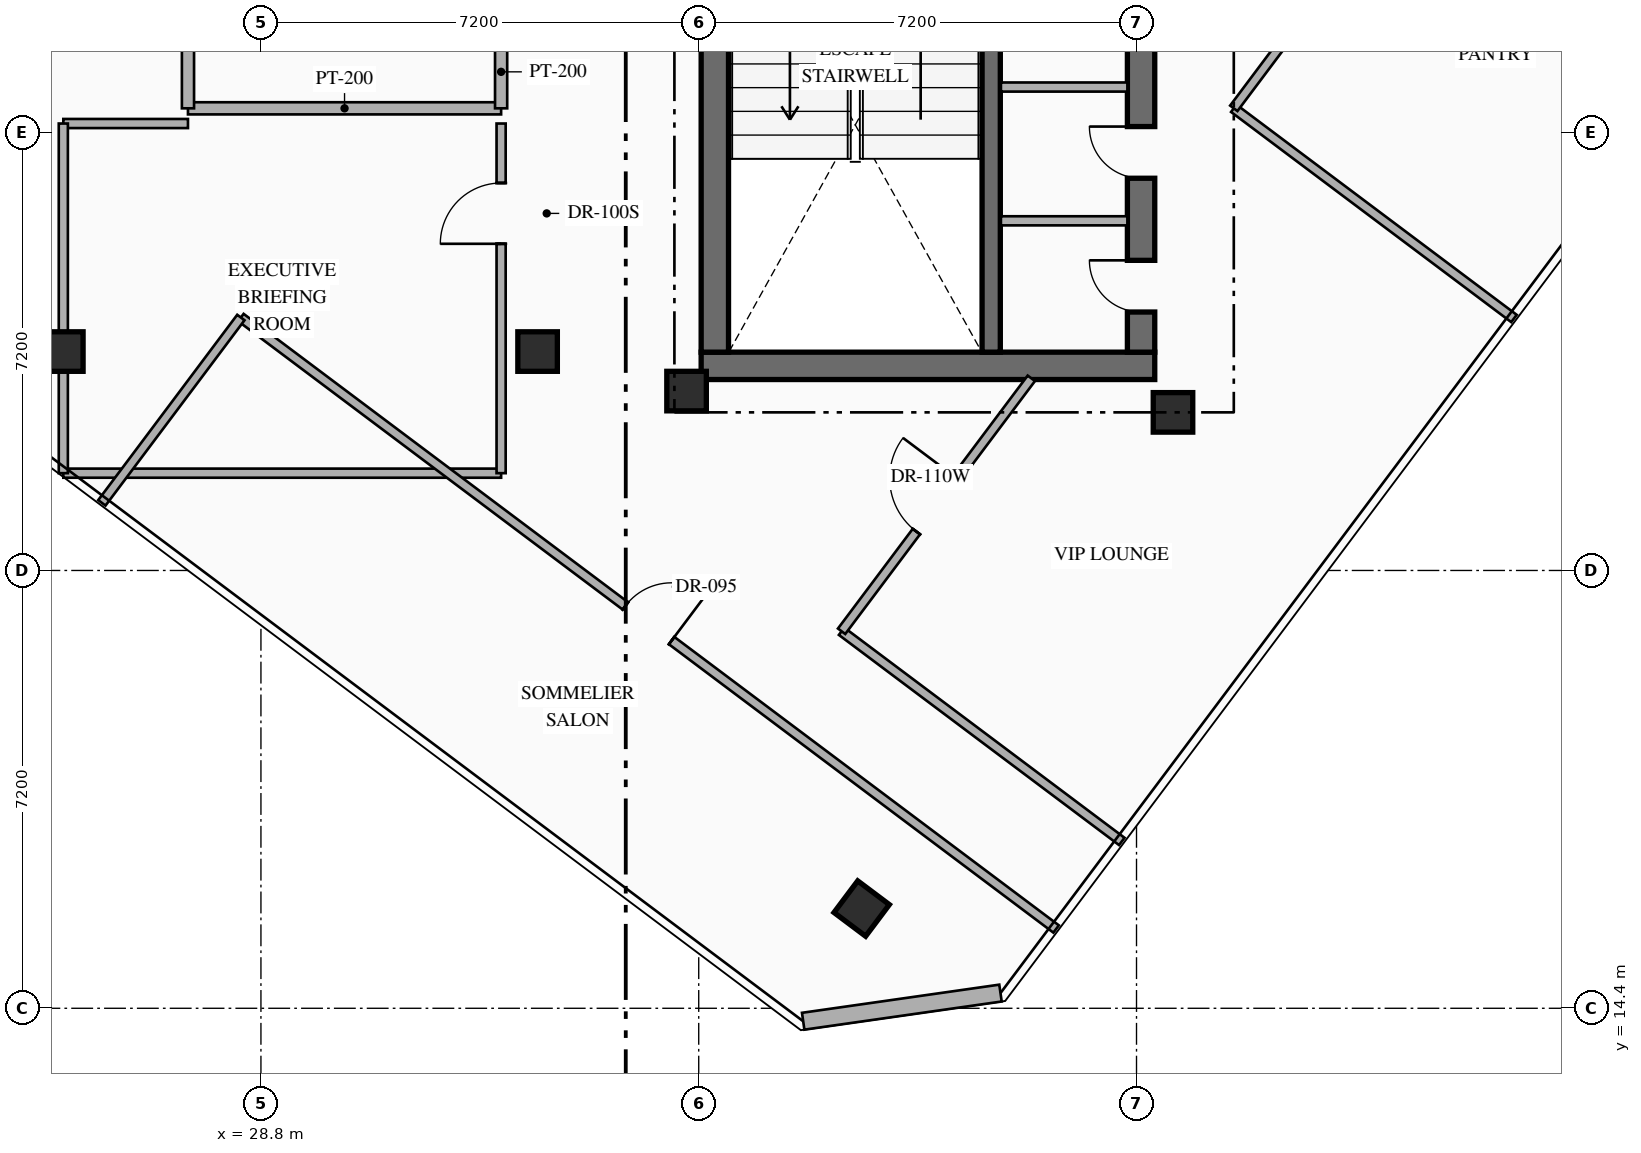
"""IFC4 building model, lengths in metres.
Left out: names, types, materials, properties, quantities, classifications, styles, units other than length and angle.
Written with IfcOpenShell. Run it as: python <this file> out.ifc"""

import sys

from ifc_helpers import new_model, si_unit, direction, frame, frame_2d, origin, origin_2d, place, context, subcontext, project, spatial, rectangle, hollow_rectangle, extrude, element, fill, save


model = new_model("IFC4")
c1 = context("Model", 3, precision=1e-05, world=origin(), true_north=direction((0.0, 1.0)))
c2 = subcontext(c1, "Body", "Model", "MODEL_VIEW")
j1 = project(units=[si_unit("LENGTHUNIT", "METRE"), si_unit("PLANEANGLEUNIT", "RADIAN")], contexts=[c1])
p1 = place(None, origin())
s1 = spatial("IfcSite", under=j1, at=p1, CompositionType="ELEMENT")
p2 = place(p1, origin())
s2 = spatial("IfcBuilding", under=s1, at=p2, CompositionType="ELEMENT")
p3 = place(p2, frame((0.0, 0.0, 261.75)))
s3 = spatial("IfcBuildingStorey", under=s2, at=p3, CompositionType="ELEMENT", Elevation=261.75)
p4 = place(p3, frame((36.04, 24.965, 0.0), z_axis=(0.0, 0.0, 1.0), x_axis=(1.0, 0.0, 0.0)))
e1 = element("IfcWall", 1, at=p4, inside=s3, PredefinedType="SHEAR", context=c2, shape_type="SweptSolid", body=[
    extrude(rectangle(XDim=7.46, YDim=0.45, at=frame_2d((3.73, 0.0))), origin(), (0.0, 0.0, 1.0), 4.2),
])
p5 = place(p3, frame((36.265, 25.19, 0.0), z_axis=(0.0, 0.0, 1.0), x_axis=(0.0, 1.0, 0.0)))
e2 = element("IfcWall", 2, at=p5, inside=s3, PredefinedType="SHEAR", context=c2, shape_type="SweptSolid", body=[
    extrude(rectangle(XDim=9.48, YDim=0.45, at=frame_2d((4.74, 0.0))), origin(), (0.0, 0.0, 1.0), 4.2),
])
p6 = place(p3, frame((43.275, 25.19, 0.0), z_axis=(0.0, 0.0, 1.0), x_axis=(0.0, 1.0, 0.0)))
e3 = element("IfcWall", 3, at=p6, inside=s3, PredefinedType="SHEAR", context=c2, shape_type="SweptSolid", body=[
    extrude(rectangle(XDim=9.48, YDim=0.45, at=frame_2d((4.74, 0.0))), origin(), (0.0, 0.0, 1.0), 4.2),
])
p7 = place(p6, frame((0.66, 0.0, 0.0)))
e4 = element("IfcOpeningElement", 4, at=p7, cuts=e3, PredefinedType="OPENING", context=c2, shape_type="SweptSolid", body=[
    extrude(rectangle(XDim=0.85, YDim=2.08, at=frame_2d((0.425, 1.04))), frame((0.0, 0.235, 0.0), z_axis=(0.0, -1.0, 0.0), x_axis=(1.0, 0.0, 0.0)), (0.0, 0.0, 1.0), 0.47),
])
p8 = place(p6, frame((2.86, 0.0, 0.0)))
e5 = element("IfcOpeningElement", 5, at=p8, cuts=e3, PredefinedType="OPENING", context=c2, shape_type="SweptSolid", body=[
    extrude(rectangle(XDim=0.85, YDim=2.08, at=frame_2d((0.425, 1.04))), frame((0.0, 0.235, 0.0), z_axis=(0.0, -1.0, 0.0), x_axis=(1.0, 0.0, 0.0)), (0.0, 0.0, 1.0), 0.47),
])
p9 = place(p6, frame((5.01, 0.0, 0.0)))
e6 = element("IfcOpeningElement", 6, at=p9, cuts=e3, PredefinedType="OPENING", context=c2, shape_type="SweptSolid", body=[
    extrude(rectangle(XDim=0.85, YDim=2.08, at=frame_2d((0.425, 1.04))), frame((0.0, 0.235, 0.0), z_axis=(0.0, -1.0, 0.0), x_axis=(1.0, 0.0, 0.0)), (0.0, 0.0, 1.0), 0.47),
])
p10 = place(p3, frame((40.81, 25.19, 0.0), z_axis=(0.0, 0.0, 1.0), x_axis=(0.0, 1.0, 0.0)))
e7 = element("IfcWall", 7, at=p10, inside=s3, PredefinedType="SHEAR", context=c2, shape_type="SweptSolid", body=[
    extrude(rectangle(XDim=9.48, YDim=0.3, at=frame_2d((4.74, 0.0))), origin(), (0.0, 0.0, 1.0), 4.2),
])
for number, where, z_axis, x_axis in (
    (8, (35.8, 24.55, 0.0), (0.0, 0.0, 1.0), (1.0, 0.0, 0.0)),
    (9, (43.8, 24.2, 0.0), (0.0, 0.0, 1.0), (1.0, 0.0, 0.0)),
    (10, (25.55, 25.2, 0.0), (0.0, 0.0, 1.0), (1.0, 0.0, 0.0)),
    (11, (33.35, 25.2, 0.0), (0.0, 0.0, 1.0), (1.0, 0.0, 0.0)),
    (12, (38.68, 16.04, 0.0), (0.0, 0.0, 1.0), (0.8, -0.6, 0.0)),
):
    element("IfcColumn", number, at=place(p3, frame(where, z_axis=z_axis, x_axis=x_axis)), inside=s3, PredefinedType="COLUMN", context=c2, shape_type="SweptSolid", body=[
        extrude(hollow_rectangle(XDim=0.65, YDim=0.65, WallThickness=0.025, at=origin_2d()), origin(), (0.0, 0.0, 1.0), 4.2),
    ])
p11 = place(p3, frame((40.963, 14.65, 0.0), z_axis=(0.0, 0.0, 1.0), x_axis=(-0.989977778067, -0.141223223777, 0.0)))
e13 = element("IfcWall", 13, at=p11, inside=s3, PredefinedType="STANDARD", context=c2, shape_type="SweptSolid", body=[
    extrude(rectangle(XDim=3.278, YDim=0.28, at=frame_2d((1.639, 0.0))), origin(), (0.0, 0.0, 1.0), 3.94),
])
for number, where, z_axis, x_axis in (
    (14, (40.97, 27.35, 0.0), (0.0, 0.0, 1.0), (1.0, 0.0, 0.0)),
    (15, (40.97, 29.55, 0.0), (0.0, 0.0, 1.0), (1.0, 0.0, 0.0)),
):
    element("IfcWall", number, at=place(p3, frame(where, z_axis=z_axis, x_axis=x_axis)), inside=s3, PredefinedType="PARTITIONING", context=c2, shape_type="SweptSolid", body=[
        extrude(rectangle(XDim=2.08, YDim=0.15, at=frame_2d((1.04, 0.0))), origin(), (0.0, 0.0, 1.0), 3.94),
    ])
p12 = place(p3, frame((27.6, 29.2, 0.0), z_axis=(0.0, 0.0, 1.0), x_axis=(1.0, 0.0, 0.0)))
e16 = element("IfcWall", 16, at=p12, inside=s3, PredefinedType="STANDARD", context=c2, shape_type="SweptSolid", body=[
    extrude(rectangle(XDim=5.15, YDim=0.2, at=frame_2d((2.575, 0.0))), origin(), (0.0, 0.0, 1.0), 3.94),
])
p13 = place(p3, frame((27.6, 29.2, 0.0), z_axis=(0.0, 0.0, 1.0), x_axis=(0.0, 1.0, 0.0)))
e17 = element("IfcWall", 17, at=p13, inside=s3, PredefinedType="STANDARD", context=c2, shape_type="SweptSolid", body=[
    extrude(rectangle(XDim=3.54, YDim=0.2, at=frame_2d((1.77, 0.0))), origin(), (0.0, 0.0, 1.0), 3.94),
])
p14 = place(p3, frame((32.75, 29.2, 0.0), z_axis=(0.0, 0.0, 1.0), x_axis=(0.0, 1.0, 0.0)))
e18 = element("IfcWall", 18, at=p14, inside=s3, PredefinedType="STANDARD", context=c2, shape_type="SweptSolid", body=[
    extrude(rectangle(XDim=3.54, YDim=0.2, at=frame_2d((1.77, 0.0))), origin(), (0.0, 0.0, 1.0), 3.94),
])
p15 = place(p14, frame((1.45, 0.0, 0.0)))
e19 = element("IfcOpeningElement", 19, at=p15, cuts=e18, PredefinedType="OPENING", context=c2, shape_type="SweptSolid", body=[
    extrude(rectangle(XDim=1.0, YDim=2.2, at=frame_2d((0.5, 1.1))), frame((0.0, 0.11, 0.0), z_axis=(0.0, -1.0, 0.0), x_axis=(1.0, 0.0, 0.0)), (0.0, 0.0, 1.0), 0.22),
])
p16 = place(p3, frame((25.55, 23.2, 0.0), z_axis=(0.0, 0.0, 1.0), x_axis=(1.0, 0.0, 0.0)))
e20 = element("IfcWall", 20, at=p16, inside=s3, PredefinedType="PARTITIONING", context=c2, shape_type="SweptSolid", body=[
    extrude(rectangle(XDim=7.2, YDim=0.15, at=frame_2d((3.6, 0.0))), origin(), (0.0, 0.0, 1.0), 3.94),
])
p17 = place(p3, frame((25.55, 28.95, 0.0), z_axis=(0.0, 0.0, 1.0), x_axis=(1.0, 0.0, 0.0)))
e21 = element("IfcWall", 21, at=p17, inside=s3, PredefinedType="PARTITIONING", context=c2, shape_type="SweptSolid", body=[
    extrude(rectangle(XDim=2.05, YDim=0.15, at=frame_2d((1.025, 0.0))), origin(), (0.0, 0.0, 1.0), 3.94),
])
p18 = place(p3, frame((25.55, 23.2, 0.0), z_axis=(0.0, 0.0, 1.0), x_axis=(0.0, 1.0, 0.0)))
e22 = element("IfcWall", 22, at=p18, inside=s3, PredefinedType="PARTITIONING", context=c2, shape_type="SweptSolid", body=[
    extrude(rectangle(XDim=5.75, YDim=0.15, at=frame_2d((2.875, 0.0))), origin(), (0.0, 0.0, 1.0), 2.445),
])
p19 = place(p3, frame((32.75, 23.2, 0.0), z_axis=(0.0, 0.0, 1.0), x_axis=(0.0, 1.0, 0.0)))
e23 = element("IfcWall", 23, at=p19, inside=s3, PredefinedType="PARTITIONING", context=c2, shape_type="SweptSolid", body=[
    extrude(rectangle(XDim=5.75, YDim=0.15, at=frame_2d((2.875, 0.0))), origin(), (0.0, 0.0, 1.0), 3.94),
])
p20 = place(p19, frame((3.772, 0.0, 0.0)))
e24 = element("IfcOpeningElement", 24, at=p20, cuts=e23, PredefinedType="OPENING", context=c2, shape_type="SweptSolid", body=[
    extrude(rectangle(XDim=1.0, YDim=2.15, at=frame_2d((0.5, 1.075))), frame((0.0, 0.085, 0.0), z_axis=(0.0, -1.0, 0.0), x_axis=(1.0, 0.0, 0.0)), (0.0, 0.0, 1.0), 0.17),
])
p21 = place(p3, frame((28.47, 25.76, 0.0), z_axis=(0.0, 0.0, 1.0), x_axis=(0.800001748029, -0.599997669287, 0.0)))
e25 = element("IfcWall", 25, at=p21, inside=s3, PredefinedType="PARTITIONING", context=c2, shape_type="SweptSolid", body=[
    extrude(rectangle(XDim=16.76, YDim=0.15, at=frame_2d((8.38, 0.0))), origin(), (0.0, 0.0, 1.0), 3.94),
])
p22 = place(p21, frame((7.905, 0.0, 0.0)))
e26 = element("IfcOpeningElement", 26, at=p22, cuts=e25, PredefinedType="OPENING", context=c2, shape_type="SweptSolid", body=[
    extrude(rectangle(XDim=0.95, YDim=2.15, at=frame_2d((0.475, 1.075))), frame((0.0, 0.085, 0.0), z_axis=(0.0, -1.0, 0.0), x_axis=(1.0, 0.0, 0.0)), (0.0, 0.0, 1.0), 0.17),
])
p23 = place(p3, frame((26.184, 22.712, 0.0), z_axis=(0.0, 0.0, 1.0), x_axis=(0.599969241761, 0.800023067755, 0.0)))
e27 = element("IfcWall", 27, at=p23, inside=s3, PredefinedType="PARTITIONING", context=c2, shape_type="SweptSolid", body=[
    extrude(rectangle(XDim=3.81, YDim=0.15, at=frame_2d((1.905, 0.0))), origin(), (0.0, 0.0, 1.0), 3.94),
])
for number, where, z_axis, x_axis in (
    (28, (38.35, 20.6, 0.0), (0.0, 0.0, 1.0), (0.8, -0.6, 0.0)),
    (29, (44.8, 29.2, 0.0), (0.0, 0.0, 1.0), (0.8, -0.6, 0.0)),
):
    element("IfcWall", number, at=place(p3, frame(where, z_axis=z_axis, x_axis=x_axis)), inside=s3, PredefinedType="PARTITIONING", context=c2, shape_type="SweptSolid", body=[
        extrude(rectangle(XDim=5.76, YDim=0.15, at=frame_2d((2.88, 0.0))), origin(), (0.0, 0.0, 1.0), 3.94),
    ])
p24 = place(p3, frame((38.35, 20.6, 0.0), z_axis=(0.0, 0.0, 1.0), x_axis=(0.599992487743, 0.800005634138, 0.0)))
e30 = element("IfcWall", 30, at=p24, inside=s3, PredefinedType="PARTITIONING", context=c2, shape_type="SweptSolid", body=[
    extrude(rectangle(XDim=5.2, YDim=0.15, at=frame_2d((2.6, 0.0))), origin(), (0.0, 0.0, 1.0), 3.94),
])
p25 = place(p24, frame((2.05, 0.0, 0.0)))
e31 = element("IfcOpeningElement", 31, at=p25, cuts=e30, PredefinedType="OPENING", context=c2, shape_type="SweptSolid", body=[
    extrude(rectangle(XDim=1.1, YDim=2.16, at=frame_2d((0.55, 1.08))), frame((0.0, 0.085, 0.0), z_axis=(0.0, -1.0, 0.0), x_axis=(1.0, 0.0, 0.0)), (0.0, 0.0, 1.0), 0.17),
])
p26 = place(p3, frame((44.8, 29.2, 0.0), z_axis=(0.0, 0.0, 1.0), x_axis=(0.599995826652, 0.800003129994, 0.0)))
e32 = element("IfcWall", 32, at=p26, inside=s3, PredefinedType="PARTITIONING", context=c2, shape_type="SweptSolid", body=[
    extrude(rectangle(XDim=9.36, YDim=0.15, at=frame_2d((4.68, 0.0))), origin(), (0.0, 0.0, 1.0), 3.94),
])
p27 = place(p26, frame((4.205, 0.0, 0.0)))
e33 = element("IfcOpeningElement", 33, at=p27, cuts=e32, PredefinedType="OPENING", context=c2, shape_type="SweptSolid", body=[
    extrude(rectangle(XDim=0.95, YDim=2.15, at=frame_2d((0.475, 1.075))), frame((0.0, 0.085, 0.0), z_axis=(0.0, -1.0, 0.0), x_axis=(1.0, 0.0, 0.0)), (0.0, 0.0, 1.0), 0.17),
])
p28 = place(p7, origin())
e34 = element("IfcDoor", 34, at=p28, inside=s3, OperationType="SINGLE_SWING_RIGHT", PredefinedType="DOOR", context=c2, shape_type="SweptSolid", body=[
    extrude(rectangle(XDim=0.85, YDim=2.08, at=frame_2d((0.425, 1.04))), frame((0.0, 0.025, 0.0), z_axis=(0.0, -1.0, 0.0), x_axis=(1.0, 0.0, 0.0)), (0.0, 0.0, 1.0), 0.05),
])
fill(e4, e34)
p29 = place(p8, origin())
e35 = element("IfcDoor", 35, at=p29, inside=s3, OperationType="SINGLE_SWING_RIGHT", PredefinedType="DOOR", context=c2, shape_type="SweptSolid", body=[
    extrude(rectangle(XDim=0.85, YDim=2.08, at=frame_2d((0.425, 1.04))), frame((0.0, 0.025, 0.0), z_axis=(0.0, -1.0, 0.0), x_axis=(1.0, 0.0, 0.0)), (0.0, 0.0, 1.0), 0.05),
])
fill(e5, e35)
p30 = place(p20, origin())
e36 = element("IfcDoor", 36, at=p30, inside=s3, OperationType="SINGLE_SWING_LEFT", PredefinedType="DOOR", context=c2, shape_type="SweptSolid", body=[
    extrude(rectangle(XDim=1.0, YDim=2.15, at=frame_2d((0.5, 1.075))), frame((0.0, 0.025, 0.0), z_axis=(0.0, -1.0, 0.0), x_axis=(1.0, 0.0, 0.0)), (0.0, 0.0, 1.0), 0.05),
])
fill(e24, e36)
p31 = place(p22, origin())
e37 = element("IfcDoor", 37, at=p31, inside=s3, OperationType="SINGLE_SWING_RIGHT", PredefinedType="DOOR", context=c2, shape_type="SweptSolid", body=[
    extrude(rectangle(XDim=0.95, YDim=2.15, at=frame_2d((0.475, 1.075))), frame((0.0, 0.025, 0.0), z_axis=(0.0, -1.0, 0.0), x_axis=(1.0, 0.0, 0.0)), (0.0, 0.0, 1.0), 0.05),
])
fill(e26, e37)
p32 = place(p25, origin())
e38 = element("IfcDoor", 38, at=p32, inside=s3, OperationType="SINGLE_SWING_RIGHT", PredefinedType="DOOR", context=c2, shape_type="SweptSolid", body=[
    extrude(rectangle(XDim=1.1, YDim=2.16, at=frame_2d((0.55, 1.08))), frame((0.0, 0.025, 0.0), z_axis=(0.0, -1.0, 0.0), x_axis=(1.0, 0.0, 0.0)), (0.0, 0.0, 1.0), 0.05),
])
fill(e31, e38)
save(model, sys.argv[1])
